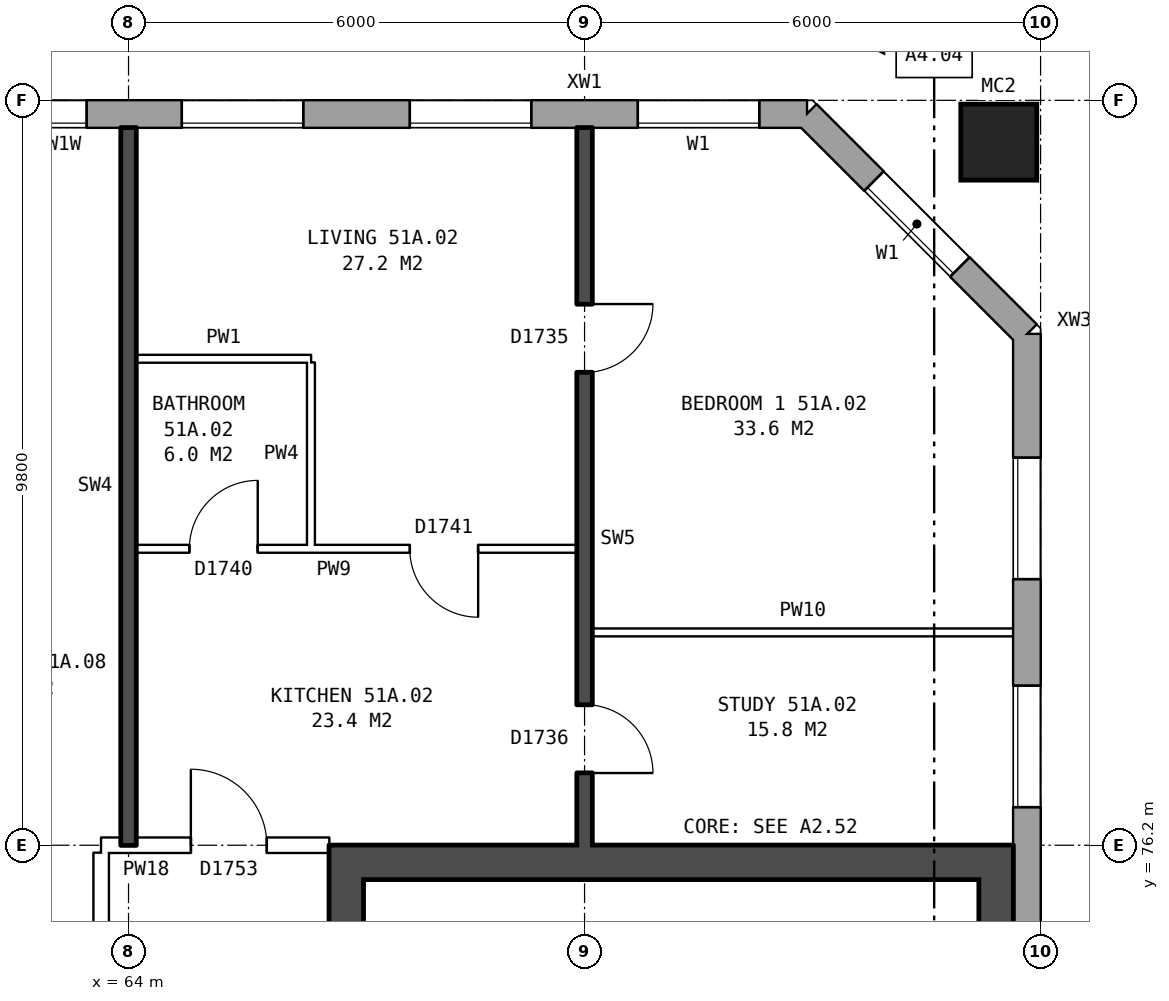
"""IFC4 building model, lengths in metres.
Left out: names, types, materials, properties, quantities, classifications, styles, units other than length and angle.
Written with IfcOpenShell. Run it as: python <this file> out.ifc"""

import sys

from ifc_helpers import new_model, si_unit, direction, frame, frame_2d, origin, origin_2d, place, context, subcontext, project, spatial, rectangle, hollow_rectangle, extrude, element, fill, save


model = new_model("IFC4")
c1 = context("Model", 3, precision=1e-05, world=origin(), true_north=direction((0.0, 1.0)))
c2 = subcontext(c1, "Body", "Model", "MODEL_VIEW")
j1 = project(units=[si_unit("LENGTHUNIT", "METRE"), si_unit("PLANEANGLEUNIT", "RADIAN")], contexts=[c1])
p1 = place(None, origin())
s1 = spatial("IfcSite", under=j1, at=p1, CompositionType="ELEMENT")
p2 = place(p1, origin())
s2 = spatial("IfcBuilding", under=s1, at=p2, CompositionType="ELEMENT")
p3 = place(p2, frame((0.0, 0.0, 182.0)))
s3 = spatial("IfcBuildingStorey", under=s2, at=p3, CompositionType="ELEMENT", Elevation=182.0)
p4 = place(p3, frame((75.45, 85.45, 0.0), z_axis=(0.0, 0.0, 1.0), x_axis=(1.0, 0.0, 0.0)))
e1 = element("IfcColumn", 1, at=p4, inside=s3, PredefinedType="COLUMN", context=c2, shape_type="SweptSolid", body=[
    extrude(hollow_rectangle(XDim=1.0, YDim=1.0, WallThickness=0.055, at=origin_2d()), origin(), (0.0, 0.0, 1.0), 3.1),
])
p5 = place(p3, frame((75.82, 57.075, 0.0), z_axis=(0.0, 0.0, 1.0), x_axis=(0.0, 1.0, 0.0)))
e2 = element("IfcWall", 2, at=p5, inside=s3, PredefinedType="STANDARD", context=c2, shape_type="SweptSolid", body=[
    extrude(rectangle(XDim=25.851, YDim=0.36, at=frame_2d((12.925, 0.0))), origin(), (0.0, 0.0, 1.0), 2.85),
])
p6 = place(p5, frame((1.625, 0.0, 0.8)))
e3 = element("IfcOpeningElement", 3, at=p6, cuts=e2, PredefinedType="OPENING", context=c2, shape_type="SweptSolid", body=[
    extrude(rectangle(XDim=1.6, YDim=1.8, at=frame_2d((0.8, 0.9))), frame((0.0, 0.19, 0.0), z_axis=(0.0, -1.0, 0.0), x_axis=(1.0, 0.0, 0.0)), (0.0, 0.0, 1.0), 0.38),
])
p7 = place(p5, frame((4.625, 0.0, 0.8)))
e4 = element("IfcOpeningElement", 4, at=p7, cuts=e2, PredefinedType="OPENING", context=c2, shape_type="SweptSolid", body=[
    extrude(rectangle(XDim=1.6, YDim=1.8, at=frame_2d((0.8, 0.9))), frame((0.0, 0.19, 0.0), z_axis=(0.0, -1.0, 0.0), x_axis=(1.0, 0.0, 0.0)), (0.0, 0.0, 1.0), 0.38),
])
p8 = place(p5, frame((19.625, 0.0, 0.8)))
e5 = element("IfcOpeningElement", 5, at=p8, cuts=e2, PredefinedType="OPENING", context=c2, shape_type="SweptSolid", body=[
    extrude(rectangle(XDim=1.6, YDim=1.8, at=frame_2d((0.8, 0.9))), frame((0.0, 0.19, 0.0), z_axis=(0.0, -1.0, 0.0), x_axis=(1.0, 0.0, 0.0)), (0.0, 0.0, 1.0), 0.38),
])
p9 = place(p5, frame((22.625, 0.0, 0.8)))
e6 = element("IfcOpeningElement", 6, at=p9, cuts=e2, PredefinedType="OPENING", context=c2, shape_type="SweptSolid", body=[
    extrude(rectangle(XDim=1.6, YDim=1.8, at=frame_2d((0.8, 0.9))), frame((0.0, 0.19, 0.0), z_axis=(0.0, -1.0, 0.0), x_axis=(1.0, 0.0, 0.0)), (0.0, 0.0, 1.0), 0.38),
])
p10 = place(p3, frame((75.82, 82.925, 0.0), z_axis=(0.0, 0.0, 1.0), x_axis=(-0.707106781187, 0.707106781187, 0.0)))
e7 = element("IfcWall", 7, at=p10, inside=s3, PredefinedType="STANDARD", context=c2, shape_type="SweptSolid", body=[
    extrude(rectangle(XDim=4.094, YDim=0.36, at=frame_2d((2.047, 0.0))), origin(), (0.0, 0.0, 1.0), 2.85),
])
p11 = place(p10, frame((1.247, 0.0, 0.8)))
e8 = element("IfcOpeningElement", 8, at=p11, cuts=e7, PredefinedType="OPENING", context=c2, shape_type="SweptSolid", body=[
    extrude(rectangle(XDim=1.6, YDim=1.8, at=frame_2d((0.8, 0.9))), frame((0.0, 0.19, 0.0), z_axis=(0.0, -1.0, 0.0), x_axis=(1.0, 0.0, 0.0)), (0.0, 0.0, 1.0), 0.38),
])
p12 = place(p3, frame((72.925, 85.82, 0.0), z_axis=(0.0, 0.0, 1.0), x_axis=(-1.0, 0.0, 0.0)))
e9 = element("IfcWall", 9, at=p12, inside=s3, PredefinedType="STANDARD", context=c2, shape_type="SweptSolid", body=[
    extrude(rectangle(XDim=39.601, YDim=0.36, at=frame_2d((19.8, 0.0))), origin(), (0.0, 0.0, 1.0), 2.85),
])
p13 = place(p12, frame((0.625, 0.0, 0.8)))
e10 = element("IfcOpeningElement", 10, at=p13, cuts=e9, PredefinedType="OPENING", context=c2, shape_type="SweptSolid", body=[
    extrude(rectangle(XDim=1.6, YDim=1.8, at=frame_2d((0.8, 0.9))), frame((0.0, 0.19, 0.0), z_axis=(0.0, -1.0, 0.0), x_axis=(1.0, 0.0, 0.0)), (0.0, 0.0, 1.0), 0.38),
])
p14 = place(p12, frame((3.625, 0.0, 0.8)))
e11 = element("IfcOpeningElement", 11, at=p14, cuts=e9, PredefinedType="OPENING", context=c2, shape_type="SweptSolid", body=[
    extrude(rectangle(XDim=1.6, YDim=1.8, at=frame_2d((0.8, 0.9))), frame((0.0, 0.19, 0.0), z_axis=(0.0, -1.0, 0.0), x_axis=(1.0, 0.0, 0.0)), (0.0, 0.0, 1.0), 0.38),
])
p15 = place(p12, frame((6.625, 0.0, 0.8)))
e12 = element("IfcOpeningElement", 12, at=p15, cuts=e9, PredefinedType="OPENING", context=c2, shape_type="SweptSolid", body=[
    extrude(rectangle(XDim=1.6, YDim=1.8, at=frame_2d((0.8, 0.9))), frame((0.0, 0.19, 0.0), z_axis=(0.0, -1.0, 0.0), x_axis=(1.0, 0.0, 0.0)), (0.0, 0.0, 1.0), 0.38),
])
p16 = place(p12, frame((9.475, 0.0, 0.35)))
e13 = element("IfcOpeningElement", 13, at=p16, cuts=e9, PredefinedType="OPENING", context=c2, shape_type="SweptSolid", body=[
    extrude(rectangle(XDim=0.6, YDim=0.9, at=frame_2d((0.3, 0.45))), frame((0.0, 0.19, 0.0), z_axis=(0.0, -1.0, 0.0), x_axis=(1.0, 0.0, 0.0)), (0.0, 0.0, 1.0), 0.38),
])
p17 = place(p12, frame((12.625, 0.0, 0.8)))
e14 = element("IfcOpeningElement", 14, at=p17, cuts=e9, PredefinedType="OPENING", context=c2, shape_type="SweptSolid", body=[
    extrude(rectangle(XDim=1.6, YDim=1.8, at=frame_2d((0.8, 0.9))), frame((0.0, 0.19, 0.0), z_axis=(0.0, -1.0, 0.0), x_axis=(1.0, 0.0, 0.0)), (0.0, 0.0, 1.0), 0.38),
])
p18 = place(p12, frame((15.625, 0.0, 0.8)))
e15 = element("IfcOpeningElement", 15, at=p18, cuts=e9, PredefinedType="OPENING", context=c2, shape_type="SweptSolid", body=[
    extrude(rectangle(XDim=1.6, YDim=1.8, at=frame_2d((0.8, 0.9))), frame((0.0, 0.19, 0.0), z_axis=(0.0, -1.0, 0.0), x_axis=(1.0, 0.0, 0.0)), (0.0, 0.0, 1.0), 0.38),
])
p19 = place(p12, frame((18.625, 0.0, 0.8)))
e16 = element("IfcOpeningElement", 16, at=p19, cuts=e9, PredefinedType="OPENING", context=c2, shape_type="SweptSolid", body=[
    extrude(rectangle(XDim=1.6, YDim=1.8, at=frame_2d((0.8, 0.9))), frame((0.0, 0.19, 0.0), z_axis=(0.0, -1.0, 0.0), x_axis=(1.0, 0.0, 0.0)), (0.0, 0.0, 1.0), 0.38),
])
p20 = place(p12, frame((21.625, 0.0, 0.8)))
e17 = element("IfcOpeningElement", 17, at=p20, cuts=e9, PredefinedType="OPENING", context=c2, shape_type="SweptSolid", body=[
    extrude(rectangle(XDim=1.6, YDim=1.8, at=frame_2d((0.8, 0.9))), frame((0.0, 0.19, 0.0), z_axis=(0.0, -1.0, 0.0), x_axis=(1.0, 0.0, 0.0)), (0.0, 0.0, 1.0), 0.38),
])
p21 = place(p12, frame((24.625, 0.0, 0.8)))
e18 = element("IfcOpeningElement", 18, at=p21, cuts=e9, PredefinedType="OPENING", context=c2, shape_type="SweptSolid", body=[
    extrude(rectangle(XDim=1.6, YDim=1.8, at=frame_2d((0.8, 0.9))), frame((0.0, 0.19, 0.0), z_axis=(0.0, -1.0, 0.0), x_axis=(1.0, 0.0, 0.0)), (0.0, 0.0, 1.0), 0.38),
])
p22 = place(p12, frame((27.125, 0.0, 0.8)))
e19 = element("IfcOpeningElement", 19, at=p22, cuts=e9, PredefinedType="OPENING", context=c2, shape_type="SweptSolid", body=[
    extrude(rectangle(XDim=1.6, YDim=1.8, at=frame_2d((0.8, 0.9))), frame((0.0, 0.19, 0.0), z_axis=(0.0, -1.0, 0.0), x_axis=(1.0, 0.0, 0.0)), (0.0, 0.0, 1.0), 0.38),
])
p23 = place(p12, frame((29.025, 0.0, 0.8)))
e20 = element("IfcOpeningElement", 20, at=p23, cuts=e9, PredefinedType="OPENING", context=c2, shape_type="SweptSolid", body=[
    extrude(rectangle(XDim=0.6, YDim=0.9, at=frame_2d((0.3, 0.45))), frame((0.0, 0.19, 0.0), z_axis=(0.0, -1.0, 0.0), x_axis=(1.0, 0.0, 0.0)), (0.0, 0.0, 1.0), 0.38),
])
p24 = place(p12, frame((33.625, 0.0, 0.8)))
e21 = element("IfcOpeningElement", 21, at=p24, cuts=e9, PredefinedType="OPENING", context=c2, shape_type="SweptSolid", body=[
    extrude(rectangle(XDim=1.6, YDim=1.8, at=frame_2d((0.8, 0.9))), frame((0.0, 0.19, 0.0), z_axis=(0.0, -1.0, 0.0), x_axis=(1.0, 0.0, 0.0)), (0.0, 0.0, 1.0), 0.38),
])
p25 = place(p12, frame((36.625, 0.0, 0.8)))
e22 = element("IfcOpeningElement", 22, at=p25, cuts=e9, PredefinedType="OPENING", context=c2, shape_type="SweptSolid", body=[
    extrude(rectangle(XDim=1.6, YDim=1.8, at=frame_2d((0.8, 0.9))), frame((0.0, 0.19, 0.0), z_axis=(0.0, -1.0, 0.0), x_axis=(1.0, 0.0, 0.0)), (0.0, 0.0, 1.0), 0.38),
])
p26 = place(p12, frame((10.375, 0.0, 0.35)))
e23 = element("IfcOpeningElement", 23, at=p26, cuts=e9, PredefinedType="OPENING", context=c2, shape_type="SweptSolid", body=[
    extrude(rectangle(XDim=1.4, YDim=1.8, at=frame_2d((0.7, 0.9))), frame((0.0, 0.19, 0.0), z_axis=(0.0, -1.0, 0.0), x_axis=(1.0, 0.0, 0.0)), (0.0, 0.0, 1.0), 0.38),
])
p27 = place(p12, frame((30.775, 0.0, 1.7)))
e24 = element("IfcOpeningElement", 24, at=p27, cuts=e9, PredefinedType="OPENING", context=c2, shape_type="SweptSolid", body=[
    extrude(rectangle(XDim=0.6, YDim=0.9, at=frame_2d((0.3, 0.45))), frame((0.0, 0.19, 0.0), z_axis=(0.0, -1.0, 0.0), x_axis=(1.0, 0.0, 0.0)), (0.0, 0.0, 1.0), 0.38),
])
p28 = place(p12, frame((31.675, 0.0, 0.8)))
e25 = element("IfcOpeningElement", 25, at=p28, cuts=e9, PredefinedType="OPENING", context=c2, shape_type="SweptSolid", body=[
    extrude(rectangle(XDim=1.0, YDim=1.8, at=frame_2d((0.5, 0.9))), frame((0.0, 0.19, 0.0), z_axis=(0.0, -1.0, 0.0), x_axis=(1.0, 0.0, 0.0)), (0.0, 0.0, 1.0), 0.38),
])
p29 = place(p3, frame((66.865, 63.8, 0.0), z_axis=(0.0, 0.0, 1.0), x_axis=(0.0, 1.0, 0.0)))
e26 = element("IfcWall", 26, at=p29, inside=s3, PredefinedType="SHEAR", context=c2, shape_type="SweptSolid", body=[
    extrude(rectangle(XDim=12.4, YDim=0.45, at=frame_2d((6.2, 0.0))), origin(), (0.0, 0.0, 1.0), 2.85),
])
p30 = place(p29, frame((1.325, 0.0, 0.0)))
e27 = element("IfcOpeningElement", 27, at=p30, cuts=e26, PredefinedType="OPENING", context=c2, shape_type="SweptSolid", body=[
    extrude(rectangle(XDim=1.1, YDim=2.1, at=frame_2d((0.55, 1.05))), frame((0.0, 0.235, 0.0), z_axis=(0.0, -1.0, 0.0), x_axis=(1.0, 0.0, 0.0)), (0.0, 0.0, 1.0), 0.47),
])
p31 = place(p29, frame((3.6, 0.0, 0.0)))
e28 = element("IfcOpeningElement", 28, at=p31, cuts=e26, PredefinedType="OPENING", context=c2, shape_type="SweptSolid", body=[
    extrude(rectangle(XDim=1.1, YDim=2.1, at=frame_2d((0.55, 1.05))), frame((0.0, 0.235, 0.0), z_axis=(0.0, -1.0, 0.0), x_axis=(1.0, 0.0, 0.0)), (0.0, 0.0, 1.0), 0.47),
])
p32 = place(p29, frame((5.8, 0.0, 0.0)))
e29 = element("IfcOpeningElement", 29, at=p32, cuts=e26, PredefinedType="OPENING", context=c2, shape_type="SweptSolid", body=[
    extrude(rectangle(XDim=1.1, YDim=2.1, at=frame_2d((0.55, 1.05))), frame((0.0, 0.235, 0.0), z_axis=(0.0, -1.0, 0.0), x_axis=(1.0, 0.0, 0.0)), (0.0, 0.0, 1.0), 0.47),
])
p33 = place(p29, frame((8.0, 0.0, 0.0)))
e30 = element("IfcOpeningElement", 30, at=p33, cuts=e26, PredefinedType="OPENING", context=c2, shape_type="SweptSolid", body=[
    extrude(rectangle(XDim=1.1, YDim=2.1, at=frame_2d((0.55, 1.05))), frame((0.0, 0.235, 0.0), z_axis=(0.0, -1.0, 0.0), x_axis=(1.0, 0.0, 0.0)), (0.0, 0.0, 1.0), 0.47),
])
p34 = place(p29, frame((9.9, 0.0, 0.0)))
e31 = element("IfcOpeningElement", 31, at=p34, cuts=e26, PredefinedType="OPENING", context=c2, shape_type="SweptSolid", body=[
    extrude(rectangle(XDim=1.1, YDim=2.1, at=frame_2d((0.55, 1.05))), frame((0.0, 0.235, 0.0), z_axis=(0.0, -1.0, 0.0), x_axis=(1.0, 0.0, 0.0)), (0.0, 0.0, 1.0), 0.47),
])
p35 = place(p3, frame((75.415, 63.8, 0.0), z_axis=(0.0, 0.0, 1.0), x_axis=(0.0, 1.0, 0.0)))
e32 = element("IfcWall", 32, at=p35, inside=s3, PredefinedType="SHEAR", context=c2, shape_type="SweptSolid", body=[
    extrude(rectangle(XDim=12.4, YDim=0.45, at=frame_2d((6.2, 0.0))), origin(), (0.0, 0.0, 1.0), 2.85),
])
p36 = place(p3, frame((67.09, 75.975, 0.0), z_axis=(0.0, 0.0, 1.0), x_axis=(1.0, 0.0, 0.0)))
e33 = element("IfcWall", 33, at=p36, inside=s3, PredefinedType="SHEAR", context=c2, shape_type="SweptSolid", body=[
    extrude(rectangle(XDim=8.1, YDim=0.45, at=frame_2d((4.05, 0.0))), origin(), (0.0, 0.0, 1.0), 2.85),
])
p37 = place(p3, frame((63.64, 63.9, 0.0), z_axis=(0.0, 0.0, 1.0), x_axis=(0.0, 1.0, 0.0)))
e34 = element("IfcWall", 34, at=p37, inside=s3, PredefinedType="PARTITIONING", context=c2, shape_type="SweptSolid", body=[
    extrude(rectangle(XDim=12.2, YDim=0.2, at=frame_2d((6.1, 0.0))), origin(), (0.0, 0.0, 1.0), 2.85),
])
p38 = place(p37, frame((5.1, 0.0, 0.0)))
e35 = element("IfcOpeningElement", 35, at=p38, cuts=e34, PredefinedType="OPENING", context=c2, shape_type="SweptSolid", body=[
    extrude(rectangle(XDim=2.0, YDim=2.1, at=frame_2d((1.0, 1.05))), frame((0.0, 0.11, 0.0), z_axis=(0.0, -1.0, 0.0), x_axis=(1.0, 0.0, 0.0)), (0.0, 0.0, 1.0), 0.22),
])
p39 = place(p3, frame((63.64, 76.2, 0.0), z_axis=(0.0, 0.0, 1.0), x_axis=(1.0, 0.0, 0.0)))
e36 = element("IfcWall", 36, at=p39, inside=s3, PredefinedType="PARTITIONING", context=c2, shape_type="SweptSolid", body=[
    extrude(rectangle(XDim=3.0, YDim=0.2, at=frame_2d((1.5, 0.0))), origin(), (0.0, 0.0, 1.0), 2.85),
])
p40 = place(p39, frame((1.18, 0.0, 0.0)))
e37 = element("IfcOpeningElement", 37, at=p40, cuts=e36, PredefinedType="OPENING", context=c2, shape_type="SweptSolid", body=[
    extrude(rectangle(XDim=1.0, YDim=2.1, at=frame_2d((0.5, 1.05))), frame((0.0, 0.11, 0.0), z_axis=(0.0, -1.0, 0.0), x_axis=(1.0, 0.0, 0.0)), (0.0, 0.0, 1.0), 0.22),
])
p41 = place(p3, frame((70.1, 79.0, 0.0), z_axis=(0.0, 0.0, 1.0), x_axis=(1.0, 0.0, 0.0)))
e38 = element("IfcWall", 38, at=p41, inside=s3, PredefinedType="PARTITIONING", context=c2, shape_type="SweptSolid", body=[
    extrude(rectangle(XDim=5.54, YDim=0.1, at=frame_2d((2.77, 0.0))), origin(), (0.0, 0.0, 1.0), 2.85),
])
p42 = place(p3, frame((64.1, 80.1, 0.0), z_axis=(0.0, 0.0, 1.0), x_axis=(1.0, 0.0, 0.0)))
e39 = element("IfcWall", 39, at=p42, inside=s3, PredefinedType="PARTITIONING", context=c2, shape_type="SweptSolid", body=[
    extrude(rectangle(XDim=5.8, YDim=0.1, at=frame_2d((2.9, 0.0))), origin(), (0.0, 0.0, 1.0), 2.85),
])
p43 = place(p42, frame((3.6, 0.0, 0.0)))
e40 = element("IfcOpeningElement", 40, at=p43, cuts=e39, PredefinedType="OPENING", context=c2, shape_type="SweptSolid", body=[
    extrude(rectangle(XDim=0.9, YDim=2.1, at=frame_2d((0.45, 1.05))), frame((0.0, 0.06, 0.0), z_axis=(0.0, -1.0, 0.0), x_axis=(1.0, 0.0, 0.0)), (0.0, 0.0, 1.0), 0.12),
])
p44 = place(p42, frame((0.7, 0.0, 0.0)))
e41 = element("IfcOpeningElement", 41, at=p44, cuts=e39, PredefinedType="OPENING", context=c2, shape_type="SweptSolid", body=[
    extrude(rectangle(XDim=0.9, YDim=2.1, at=frame_2d((0.45, 1.05))), frame((0.0, 0.06, 0.0), z_axis=(0.0, -1.0, 0.0), x_axis=(1.0, 0.0, 0.0)), (0.0, 0.0, 1.0), 0.12),
])
p45 = place(p3, frame((64.1, 82.6, 0.0), z_axis=(0.0, 0.0, 1.0), x_axis=(1.0, 0.0, 0.0)))
e42 = element("IfcWall", 42, at=p45, inside=s3, PredefinedType="PARTITIONING", context=c2, shape_type="SweptSolid", body=[
    extrude(rectangle(XDim=2.3, YDim=0.1, at=frame_2d((1.15, 0.0))), origin(), (0.0, 0.0, 1.0), 2.85),
])
p46 = place(p3, frame((64.0, 76.2, 0.0), z_axis=(0.0, 0.0, 1.0), x_axis=(0.0, 1.0, 0.0)))
e43 = element("IfcWall", 43, at=p46, inside=s3, PredefinedType="SOLIDWALL", context=c2, shape_type="SweptSolid", body=[
    extrude(rectangle(XDim=9.44, YDim=0.2, at=frame_2d((4.72, 0.0))), origin(), (0.0, 0.0, 1.0), 2.85),
])
p47 = place(p3, frame((66.4, 80.15, 0.0), z_axis=(0.0, 0.0, 1.0), x_axis=(0.0, 1.0, 0.0)))
e44 = element("IfcWall", 44, at=p47, inside=s3, PredefinedType="PARTITIONING", context=c2, shape_type="SweptSolid", body=[
    extrude(rectangle(XDim=2.4, YDim=0.1, at=frame_2d((1.2, 0.0))), origin(), (0.0, 0.0, 1.0), 2.85),
])
p48 = place(p3, frame((70.0, 76.2, 0.0), z_axis=(0.0, 0.0, 1.0), x_axis=(0.0, 1.0, 0.0)))
e45 = element("IfcWall", 45, at=p48, inside=s3, PredefinedType="SOLIDWALL", context=c2, shape_type="SweptSolid", body=[
    extrude(rectangle(XDim=9.44, YDim=0.2, at=frame_2d((4.72, 0.0))), origin(), (0.0, 0.0, 1.0), 2.85),
])
p49 = place(p48, frame((6.22, 0.0, 0.0)))
e46 = element("IfcOpeningElement", 46, at=p49, cuts=e45, PredefinedType="OPENING", context=c2, shape_type="SweptSolid", body=[
    extrude(rectangle(XDim=0.9, YDim=2.1, at=frame_2d((0.45, 1.05))), frame((0.0, 0.11, 0.0), z_axis=(0.0, -1.0, 0.0), x_axis=(1.0, 0.0, 0.0)), (0.0, 0.0, 1.0), 0.22),
])
p50 = place(p48, frame((0.95, 0.0, 0.0)))
e47 = element("IfcOpeningElement", 47, at=p50, cuts=e45, PredefinedType="OPENING", context=c2, shape_type="SweptSolid", body=[
    extrude(rectangle(XDim=0.9, YDim=2.1, at=frame_2d((0.45, 1.05))), frame((0.0, 0.11, 0.0), z_axis=(0.0, -1.0, 0.0), x_axis=(1.0, 0.0, 0.0)), (0.0, 0.0, 1.0), 0.22),
])
p51 = place(p8, origin())
e48 = element("IfcWindow", 48, at=p51, inside=s3, PartitioningType="SINGLE_PANEL", PredefinedType="WINDOW", context=c2, shape_type="SweptSolid", body=[
    extrude(rectangle(XDim=1.6, YDim=1.8, at=frame_2d((0.8, 0.9))), frame((0.0, 0.15, 0.0), z_axis=(0.0, -1.0, 0.0), x_axis=(1.0, 0.0, 0.0)), (0.0, 0.0, 1.0), 0.06),
])
fill(e5, e48)
p52 = place(p9, origin())
e49 = element("IfcWindow", 49, at=p52, inside=s3, PartitioningType="SINGLE_PANEL", PredefinedType="WINDOW", context=c2, shape_type="SweptSolid", body=[
    extrude(rectangle(XDim=1.6, YDim=1.8, at=frame_2d((0.8, 0.9))), frame((0.0, 0.15, 0.0), z_axis=(0.0, -1.0, 0.0), x_axis=(1.0, 0.0, 0.0)), (0.0, 0.0, 1.0), 0.06),
])
fill(e6, e49)
p53 = place(p11, origin())
e50 = element("IfcWindow", 50, at=p53, inside=s3, PartitioningType="SINGLE_PANEL", PredefinedType="WINDOW", context=c2, shape_type="SweptSolid", body=[
    extrude(rectangle(XDim=1.6, YDim=1.8, at=frame_2d((0.8, 0.9))), frame((0.0, 0.15, 0.0), z_axis=(0.0, -1.0, 0.0), x_axis=(1.0, 0.0, 0.0)), (0.0, 0.0, 1.0), 0.06),
])
fill(e8, e50)
p54 = place(p13, origin())
e51 = element("IfcWindow", 51, at=p54, inside=s3, PartitioningType="SINGLE_PANEL", PredefinedType="WINDOW", context=c2, shape_type="SweptSolid", body=[
    extrude(rectangle(XDim=1.6, YDim=1.8, at=frame_2d((0.8, 0.9))), frame((0.0, 0.15, 0.0), z_axis=(0.0, -1.0, 0.0), x_axis=(1.0, 0.0, 0.0)), (0.0, 0.0, 1.0), 0.06),
])
fill(e10, e51)
p55 = place(p14, origin())
e52 = element("IfcWindow", 52, at=p55, inside=s3, PartitioningType="SINGLE_PANEL", PredefinedType="WINDOW", context=c2, shape_type="SweptSolid", body=[
    extrude(rectangle(XDim=1.6, YDim=1.8, at=frame_2d((0.8, 0.9))), frame((0.0, 0.15, 0.0), z_axis=(0.0, -1.0, 0.0), x_axis=(1.0, 0.0, 0.0)), (0.0, 0.0, 1.0), 0.06),
])
fill(e11, e52)
p56 = place(p15, origin())
e53 = element("IfcWindow", 53, at=p56, inside=s3, PartitioningType="SINGLE_PANEL", PredefinedType="WINDOW", context=c2, shape_type="SweptSolid", body=[
    extrude(rectangle(XDim=1.6, YDim=1.8, at=frame_2d((0.8, 0.9))), frame((0.0, 0.15, 0.0), z_axis=(0.0, -1.0, 0.0), x_axis=(1.0, 0.0, 0.0)), (0.0, 0.0, 1.0), 0.06),
])
fill(e12, e53)
p57 = place(p16, origin())
e54 = element("IfcWindow", 54, at=p57, inside=s3, PartitioningType="SINGLE_PANEL", PredefinedType="WINDOW", context=c2, shape_type="SweptSolid", body=[
    extrude(rectangle(XDim=0.6, YDim=0.9, at=frame_2d((0.3, 0.45))), frame((0.0, 0.15, 0.0), z_axis=(0.0, -1.0, 0.0), x_axis=(1.0, 0.0, 0.0)), (0.0, 0.0, 1.0), 0.06),
])
fill(e13, e54)
p58 = place(p49, frame((0.9, 0.0, 0.0), z_axis=(0.0, 0.0, 1.0), x_axis=(-1.0, 0.0, 0.0)))
e55 = element("IfcDoor", 55, at=p58, inside=s3, OperationType="SINGLE_SWING_LEFT", PredefinedType="DOOR", context=c2, shape_type="SweptSolid", body=[
    extrude(rectangle(XDim=0.9, YDim=2.1, at=frame_2d((0.45, 1.05))), frame((0.0, 0.025, 0.0), z_axis=(0.0, -1.0, 0.0), x_axis=(1.0, 0.0, 0.0)), (0.0, 0.0, 1.0), 0.05),
])
fill(e46, e55)
p59 = place(p50, frame((0.9, 0.0, 0.0), z_axis=(0.0, 0.0, 1.0), x_axis=(-1.0, 0.0, 0.0)))
e56 = element("IfcDoor", 56, at=p59, inside=s3, OperationType="SINGLE_SWING_RIGHT", PredefinedType="DOOR", context=c2, shape_type="SweptSolid", body=[
    extrude(rectangle(XDim=0.9, YDim=2.1, at=frame_2d((0.45, 1.05))), frame((0.0, 0.025, 0.0), z_axis=(0.0, -1.0, 0.0), x_axis=(1.0, 0.0, 0.0)), (0.0, 0.0, 1.0), 0.05),
])
fill(e47, e56)
p60 = place(p40, origin())
e57 = element("IfcDoor", 57, at=p60, inside=s3, OperationType="SINGLE_SWING_LEFT", PredefinedType="DOOR", context=c2, shape_type="SweptSolid", body=[
    extrude(rectangle(XDim=1.0, YDim=2.1, at=frame_2d((0.5, 1.05))), frame((0.0, 0.025, 0.0), z_axis=(0.0, -1.0, 0.0), x_axis=(1.0, 0.0, 0.0)), (0.0, 0.0, 1.0), 0.05),
])
fill(e37, e57)
p61 = place(p43, frame((0.9, 0.0, 0.0), z_axis=(0.0, 0.0, 1.0), x_axis=(-1.0, 0.0, 0.0)))
e58 = element("IfcDoor", 58, at=p61, inside=s3, OperationType="SINGLE_SWING_LEFT", PredefinedType="DOOR", context=c2, shape_type="SweptSolid", body=[
    extrude(rectangle(XDim=0.9, YDim=2.1, at=frame_2d((0.45, 1.05))), frame((0.0, 0.025, 0.0), z_axis=(0.0, -1.0, 0.0), x_axis=(1.0, 0.0, 0.0)), (0.0, 0.0, 1.0), 0.05),
])
fill(e40, e58)
p62 = place(p44, origin())
e59 = element("IfcDoor", 59, at=p62, inside=s3, OperationType="SINGLE_SWING_RIGHT", PredefinedType="DOOR", context=c2, shape_type="SweptSolid", body=[
    extrude(rectangle(XDim=0.9, YDim=2.1, at=frame_2d((0.45, 1.05))), frame((0.0, 0.025, 0.0), z_axis=(0.0, -1.0, 0.0), x_axis=(1.0, 0.0, 0.0)), (0.0, 0.0, 1.0), 0.05),
])
fill(e41, e59)
save(model, sys.argv[1])
